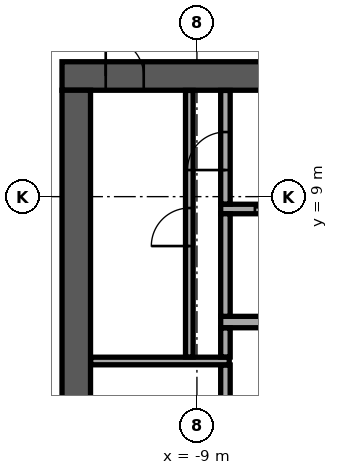
"""IFC4 building model, lengths in metres.
Left out: names, types, materials, properties, quantities, classifications, styles, units other than length and angle.
Written with IfcOpenShell. Run it as: python <this file> out.ifc"""

import sys

from ifc_helpers import new_model, si_unit, direction, frame, frame_2d, origin, place, context, subcontext, project, spatial, rectangle, extrude, element, fill, save


model = new_model("IFC4")
c1 = context("Model", 3, precision=1e-05, world=origin(), true_north=direction((0.0, 1.0)))
c2 = subcontext(c1, "Body", "Model", "MODEL_VIEW")
j1 = project(units=[si_unit("LENGTHUNIT", "METRE"), si_unit("PLANEANGLEUNIT", "RADIAN")], contexts=[c1])
p1 = place(None, origin())
s1 = spatial("IfcSite", under=j1, at=p1, CompositionType="ELEMENT")
p2 = place(p1, origin())
s2 = spatial("IfcBuilding", under=s1, at=p2, CompositionType="ELEMENT")
p3 = place(p2, frame((0.0, 0.0, 242.9)))
s3 = spatial("IfcBuildingStorey", under=s2, at=p3, CompositionType="ELEMENT", Elevation=242.9)
p4 = place(p3, frame((-12.55, 12.175, 0.0), z_axis=(0.0, 0.0, 1.0), x_axis=(1.0, 0.0, 0.0)))
e1 = element("IfcWall", 1, at=p4, inside=s3, PredefinedType="SHEAR", context=c2, shape_type="SweptSolid", body=[
    extrude(rectangle(XDim=25.1, YDim=0.75, at=frame_2d((12.55, 0.0))), origin(), (0.0, 0.0, 1.0), 3.64),
])
p5 = place(p4, frame((11.35, 0.0, 0.0)))
e2 = element("IfcOpeningElement", 2, at=p5, cuts=e1, PredefinedType="OPENING", context=c2, shape_type="SweptSolid", body=[
    extrude(rectangle(XDim=2.4, YDim=2.4, at=frame_2d((1.2, 1.2))), frame((0.0, 0.385, 0.0), z_axis=(0.0, -1.0, 0.0), x_axis=(1.0, 0.0, 0.0)), (0.0, 0.0, 1.0), 0.77),
])
p6 = place(p4, frame((22.175, 0.0, 0.0)))
e3 = element("IfcOpeningElement", 3, at=p6, cuts=e1, PredefinedType="OPENING", context=c2, shape_type="SweptSolid", body=[
    extrude(rectangle(XDim=1.2, YDim=2.1, at=frame_2d((0.6, 1.05))), frame((0.0, 0.385, 0.0), z_axis=(0.0, -1.0, 0.0), x_axis=(1.0, 0.0, 0.0)), (0.0, 0.0, 1.0), 0.77),
])
p7 = place(p4, frame((1.15, 0.0, 0.0)))
e4 = element("IfcOpeningElement", 4, at=p7, cuts=e1, PredefinedType="OPENING", context=c2, shape_type="SweptSolid", body=[
    extrude(rectangle(XDim=1.0, YDim=2.1, at=frame_2d((0.5, 1.05))), frame((0.0, 0.385, 0.0), z_axis=(0.0, -1.0, 0.0), x_axis=(1.0, 0.0, 0.0)), (0.0, 0.0, 1.0), 0.77),
])
p8 = place(p3, frame((-12.175, -11.8, 0.0), z_axis=(0.0, 0.0, 1.0), x_axis=(0.0, 1.0, 0.0)))
e5 = element("IfcWall", 5, at=p8, inside=s3, PredefinedType="SHEAR", context=c2, shape_type="SweptSolid", body=[
    extrude(rectangle(XDim=23.6, YDim=0.75, at=frame_2d((11.8, 0.0))), origin(), (0.0, 0.0, 1.0), 3.64),
])
p9 = place(p8, frame((10.6, 0.0, 0.0)))
e6 = element("IfcOpeningElement", 6, at=p9, cuts=e5, PredefinedType="OPENING", context=c2, shape_type="SweptSolid", body=[
    extrude(rectangle(XDim=2.4, YDim=2.4, at=frame_2d((1.2, 1.2))), frame((0.0, 0.385, 0.0), z_axis=(0.0, -1.0, 0.0), x_axis=(1.0, 0.0, 0.0)), (0.0, 0.0, 1.0), 0.77),
])
p10 = place(p3, frame((-8.375, 5.7, 0.0), z_axis=(0.0, 0.0, 1.0), x_axis=(1.0, 0.0, 0.0)))
e7 = element("IfcWall", 7, at=p10, inside=s3, PredefinedType="SOLIDWALL", context=c2, shape_type="SweptSolid", body=[
    extrude(rectangle(XDim=16.75, YDim=0.3, at=frame_2d((8.375, 0.0))), origin(), (0.0, 0.0, 1.0), 3.64),
])
p11 = place(p3, frame((-8.375, 8.675, 0.0), z_axis=(0.0, 0.0, 1.0), x_axis=(1.0, 0.0, 0.0)))
e8 = element("IfcWall", 8, at=p11, inside=s3, PredefinedType="SOLIDWALL", context=c2, shape_type="SweptSolid", body=[
    extrude(rectangle(XDim=16.75, YDim=0.25, at=frame_2d((8.375, 0.0))), origin(), (0.0, 0.0, 1.0), 3.64),
])
p12 = place(p11, frame((0.9, 0.0, 0.0)))
e9 = element("IfcOpeningElement", 9, at=p12, cuts=e8, PredefinedType="OPENING", context=c2, shape_type="SweptSolid", body=[
    extrude(rectangle(XDim=1.2, YDim=2.1, at=frame_2d((0.6, 1.05))), frame((0.0, 0.135, 0.0), z_axis=(0.0, -1.0, 0.0), x_axis=(1.0, 0.0, 0.0)), (0.0, 0.0, 1.0), 0.27),
])
p13 = place(p11, frame((3.65, 0.0, 0.0)))
e10 = element("IfcOpeningElement", 10, at=p13, cuts=e8, PredefinedType="OPENING", context=c2, shape_type="SweptSolid", body=[
    extrude(rectangle(XDim=1.2, YDim=2.1, at=frame_2d((0.6, 1.05))), frame((0.0, 0.135, 0.0), z_axis=(0.0, -1.0, 0.0), x_axis=(1.0, 0.0, 0.0)), (0.0, 0.0, 1.0), 0.27),
])
p14 = place(p11, frame((6.4, 0.0, 0.0)))
e11 = element("IfcOpeningElement", 11, at=p14, cuts=e8, PredefinedType="OPENING", context=c2, shape_type="SweptSolid", body=[
    extrude(rectangle(XDim=1.2, YDim=2.1, at=frame_2d((0.6, 1.05))), frame((0.0, 0.135, 0.0), z_axis=(0.0, -1.0, 0.0), x_axis=(1.0, 0.0, 0.0)), (0.0, 0.0, 1.0), 0.27),
])
p15 = place(p11, frame((9.15, 0.0, 0.0)))
e12 = element("IfcOpeningElement", 12, at=p15, cuts=e8, PredefinedType="OPENING", context=c2, shape_type="SweptSolid", body=[
    extrude(rectangle(XDim=1.2, YDim=2.1, at=frame_2d((0.6, 1.05))), frame((0.0, 0.135, 0.0), z_axis=(0.0, -1.0, 0.0), x_axis=(1.0, 0.0, 0.0)), (0.0, 0.0, 1.0), 0.27),
])
p16 = place(p11, frame((11.9, 0.0, 0.0)))
e13 = element("IfcOpeningElement", 13, at=p16, cuts=e8, PredefinedType="OPENING", context=c2, shape_type="SweptSolid", body=[
    extrude(rectangle(XDim=1.2, YDim=2.1, at=frame_2d((0.6, 1.05))), frame((0.0, 0.135, 0.0), z_axis=(0.0, -1.0, 0.0), x_axis=(1.0, 0.0, 0.0)), (0.0, 0.0, 1.0), 0.27),
])
p17 = place(p11, frame((14.65, 0.0, 0.0)))
e14 = element("IfcOpeningElement", 14, at=p17, cuts=e8, PredefinedType="OPENING", context=c2, shape_type="SweptSolid", body=[
    extrude(rectangle(XDim=1.2, YDim=2.1, at=frame_2d((0.6, 1.05))), frame((0.0, 0.135, 0.0), z_axis=(0.0, -1.0, 0.0), x_axis=(1.0, 0.0, 0.0)), (0.0, 0.0, 1.0), 0.27),
])
p18 = place(p3, frame((-8.25, 5.85, 0.0), z_axis=(0.0, 0.0, 1.0), x_axis=(0.0, 1.0, 0.0)))
e15 = element("IfcWall", 15, at=p18, inside=s3, PredefinedType="SOLIDWALL", context=c2, shape_type="SweptSolid", body=[
    extrude(rectangle(XDim=2.7, YDim=0.25, at=frame_2d((1.35, 0.0))), origin(), (0.0, 0.0, 1.0), 3.64),
])
p19 = place(p3, frame((-8.25, 2.855, 0.0), z_axis=(0.0, 0.0, 1.0), x_axis=(0.0, 1.0, 0.0)))
e16 = element("IfcWall", 16, at=p19, inside=s3, PredefinedType="PARTITIONING", context=c2, shape_type="SweptSolid", body=[
    extrude(rectangle(XDim=1.715, YDim=0.25, at=frame_2d((0.857, 0.0))), origin(), (0.0, 0.0, 1.0), 3.64),
])
p20 = place(p3, frame((-11.795, 4.675, 0.0), z_axis=(0.0, 0.0, 1.0), x_axis=(1.0, 0.0, 0.0)))
e17 = element("IfcWall", 17, at=p20, inside=s3, PredefinedType="PARTITIONING", context=c2, shape_type="SweptSolid", body=[
    extrude(rectangle(XDim=3.645, YDim=0.2, at=frame_2d((1.823, 0.0))), origin(), (0.0, 0.0, 1.0), 3.64),
])
p21 = place(p3, frame((-9.2, 4.78, 0.0), z_axis=(0.0, 0.0, 1.0), x_axis=(0.0, 1.0, 0.0)))
e18 = element("IfcWall", 18, at=p21, inside=s3, PredefinedType="PARTITIONING", context=c2, shape_type="SweptSolid", body=[
    extrude(rectangle(XDim=7.015, YDim=0.2, at=frame_2d((3.507, 0.0))), origin(), (0.0, 0.0, 1.0), 3.64),
])
p22 = place(p21, frame((2.92, 0.0, 0.0)))
e19 = element("IfcOpeningElement", 19, at=p22, cuts=e18, PredefinedType="OPENING", context=c2, shape_type="SweptSolid", body=[
    extrude(rectangle(XDim=1.0, YDim=2.1, at=frame_2d((0.5, 1.05))), frame((0.0, 0.11, 0.0), z_axis=(0.0, -1.0, 0.0), x_axis=(1.0, 0.0, 0.0)), (0.0, 0.0, 1.0), 0.22),
])
p23 = place(p3, frame((-8.25, 4.78, 0.0), z_axis=(0.0, 0.0, 1.0), x_axis=(0.0, 1.0, 0.0)))
e20 = element("IfcWall", 20, at=p23, inside=s3, PredefinedType="PARTITIONING", context=c2, shape_type="SweptSolid", body=[
    extrude(rectangle(XDim=0.765, YDim=0.25, at=frame_2d((0.382, 0.0))), origin(), (0.0, 0.0, 1.0), 3.64),
])
p24 = place(p3, frame((-8.25, 8.805, 0.0), z_axis=(0.0, 0.0, 1.0), x_axis=(0.0, 1.0, 0.0)))
e21 = element("IfcWall", 21, at=p24, inside=s3, PredefinedType="PARTITIONING", context=c2, shape_type="SweptSolid", body=[
    extrude(rectangle(XDim=2.99, YDim=0.25, at=frame_2d((1.495, 0.0))), origin(), (0.0, 0.0, 1.0), 3.64),
])
p25 = place(p24, frame((0.895, 0.0, 0.0)))
e22 = element("IfcOpeningElement", 22, at=p25, cuts=e21, PredefinedType="OPENING", context=c2, shape_type="SweptSolid", body=[
    extrude(rectangle(XDim=1.0, YDim=2.1, at=frame_2d((0.5, 1.05))), frame((0.0, 0.135, 0.0), z_axis=(0.0, -1.0, 0.0), x_axis=(1.0, 0.0, 0.0)), (0.0, 0.0, 1.0), 0.27),
])
p26 = place(p3, frame((-5.115, 33.491, 0.0), z_axis=(0.0, 0.0, 1.0), x_axis=(-0.57357740375, -0.819151366908, 0.0)))
e23 = element("IfcWall", 23, at=p26, inside=s3, PredefinedType="STANDARD", context=c2, shape_type="SweptSolid", body=[
    extrude(rectangle(XDim=48.843, YDim=0.6, at=frame_2d((24.422, 0.0))), origin(), (0.0, 0.0, 1.0), 3.64),
])
p27 = place(p26, frame((1.22, 0.0, 0.9)))
e24 = element("IfcOpeningElement", 24, at=p27, cuts=e23, PredefinedType="OPENING", context=c2, shape_type="SweptSolid", body=[
    extrude(rectangle(XDim=2.0, YDim=2.1, at=frame_2d((1.0, 1.05))), frame((0.0, 0.31, 0.0), z_axis=(0.0, -1.0, 0.0), x_axis=(1.0, 0.0, 0.0)), (0.0, 0.0, 1.0), 0.62),
])
p28 = place(p26, frame((5.66, 0.0, 0.9)))
e25 = element("IfcOpeningElement", 25, at=p28, cuts=e23, PredefinedType="OPENING", context=c2, shape_type="SweptSolid", body=[
    extrude(rectangle(XDim=2.0, YDim=2.1, at=frame_2d((1.0, 1.05))), frame((0.0, 0.31, 0.0), z_axis=(0.0, -1.0, 0.0), x_axis=(1.0, 0.0, 0.0)), (0.0, 0.0, 1.0), 0.62),
])
p29 = place(p26, frame((10.101, 0.0, 0.9)))
e26 = element("IfcOpeningElement", 26, at=p29, cuts=e23, PredefinedType="OPENING", context=c2, shape_type="SweptSolid", body=[
    extrude(rectangle(XDim=2.0, YDim=2.1, at=frame_2d((1.0, 1.05))), frame((0.0, 0.31, 0.0), z_axis=(0.0, -1.0, 0.0), x_axis=(1.0, 0.0, 0.0)), (0.0, 0.0, 1.0), 0.62),
])
p30 = place(p26, frame((14.541, 0.0, 0.9)))
e27 = element("IfcOpeningElement", 27, at=p30, cuts=e23, PredefinedType="OPENING", context=c2, shape_type="SweptSolid", body=[
    extrude(rectangle(XDim=2.0, YDim=2.1, at=frame_2d((1.0, 1.05))), frame((0.0, 0.31, 0.0), z_axis=(0.0, -1.0, 0.0), x_axis=(1.0, 0.0, 0.0)), (0.0, 0.0, 1.0), 0.62),
])
p31 = place(p26, frame((18.981, 0.0, 0.9)))
e28 = element("IfcOpeningElement", 28, at=p31, cuts=e23, PredefinedType="OPENING", context=c2, shape_type="SweptSolid", body=[
    extrude(rectangle(XDim=2.0, YDim=2.1, at=frame_2d((1.0, 1.05))), frame((0.0, 0.31, 0.0), z_axis=(0.0, -1.0, 0.0), x_axis=(1.0, 0.0, 0.0)), (0.0, 0.0, 1.0), 0.62),
])
p32 = place(p26, frame((23.422, 0.0, 0.9)))
e29 = element("IfcOpeningElement", 29, at=p32, cuts=e23, PredefinedType="OPENING", context=c2, shape_type="SweptSolid", body=[
    extrude(rectangle(XDim=2.0, YDim=2.1, at=frame_2d((1.0, 1.05))), frame((0.0, 0.31, 0.0), z_axis=(0.0, -1.0, 0.0), x_axis=(1.0, 0.0, 0.0)), (0.0, 0.0, 1.0), 0.62),
])
p33 = place(p26, frame((27.862, 0.0, 0.9)))
e30 = element("IfcOpeningElement", 30, at=p33, cuts=e23, PredefinedType="OPENING", context=c2, shape_type="SweptSolid", body=[
    extrude(rectangle(XDim=2.0, YDim=2.1, at=frame_2d((1.0, 1.05))), frame((0.0, 0.31, 0.0), z_axis=(0.0, -1.0, 0.0), x_axis=(1.0, 0.0, 0.0)), (0.0, 0.0, 1.0), 0.62),
])
p34 = place(p26, frame((32.302, 0.0, 0.9)))
e31 = element("IfcOpeningElement", 31, at=p34, cuts=e23, PredefinedType="OPENING", context=c2, shape_type="SweptSolid", body=[
    extrude(rectangle(XDim=2.0, YDim=2.1, at=frame_2d((1.0, 1.05))), frame((0.0, 0.31, 0.0), z_axis=(0.0, -1.0, 0.0), x_axis=(1.0, 0.0, 0.0)), (0.0, 0.0, 1.0), 0.62),
])
p35 = place(p26, frame((36.742, 0.0, 0.9)))
e32 = element("IfcOpeningElement", 32, at=p35, cuts=e23, PredefinedType="OPENING", context=c2, shape_type="SweptSolid", body=[
    extrude(rectangle(XDim=2.0, YDim=2.1, at=frame_2d((1.0, 1.05))), frame((0.0, 0.31, 0.0), z_axis=(0.0, -1.0, 0.0), x_axis=(1.0, 0.0, 0.0)), (0.0, 0.0, 1.0), 0.62),
])
p36 = place(p26, frame((41.183, 0.0, 0.9)))
e33 = element("IfcOpeningElement", 33, at=p36, cuts=e23, PredefinedType="OPENING", context=c2, shape_type="SweptSolid", body=[
    extrude(rectangle(XDim=2.0, YDim=2.1, at=frame_2d((1.0, 1.05))), frame((0.0, 0.31, 0.0), z_axis=(0.0, -1.0, 0.0), x_axis=(1.0, 0.0, 0.0)), (0.0, 0.0, 1.0), 0.62),
])
p37 = place(p26, frame((45.623, 0.0, 0.9)))
e34 = element("IfcOpeningElement", 34, at=p37, cuts=e23, PredefinedType="OPENING", context=c2, shape_type="SweptSolid", body=[
    extrude(rectangle(XDim=2.0, YDim=2.1, at=frame_2d((1.0, 1.05))), frame((0.0, 0.31, 0.0), z_axis=(0.0, -1.0, 0.0), x_axis=(1.0, 0.0, 0.0)), (0.0, 0.0, 1.0), 0.62),
])
p38 = place(p7, origin())
e35 = element("IfcDoor", 35, at=p38, inside=s3, OperationType="SINGLE_SWING_LEFT", PredefinedType="DOOR", context=c2, shape_type="SweptSolid", body=[
    extrude(rectangle(XDim=1.0, YDim=2.1, at=frame_2d((0.5, 1.05))), frame((0.0, 0.025, 0.0), z_axis=(0.0, -1.0, 0.0), x_axis=(1.0, 0.0, 0.0)), (0.0, 0.0, 1.0), 0.05),
])
fill(e4, e35)
p39 = place(p12, origin())
e36 = element("IfcDoor", 36, at=p39, inside=s3, OperationType="DOUBLE_DOOR_SLIDING", PredefinedType="DOOR", context=c2, shape_type="SweptSolid", body=[
    extrude(rectangle(XDim=1.2, YDim=2.1, at=frame_2d((0.6, 1.05))), frame((0.0, 0.025, 0.0), z_axis=(0.0, -1.0, 0.0), x_axis=(1.0, 0.0, 0.0)), (0.0, 0.0, 1.0), 0.05),
])
fill(e9, e36)
p40 = place(p22, origin())
e37 = element("IfcDoor", 37, at=p40, inside=s3, OperationType="SINGLE_SWING_RIGHT", PredefinedType="DOOR", context=c2, shape_type="SweptSolid", body=[
    extrude(rectangle(XDim=1.0, YDim=2.1, at=frame_2d((0.5, 1.05))), frame((0.0, 0.025, 0.0), z_axis=(0.0, -1.0, 0.0), x_axis=(1.0, 0.0, 0.0)), (0.0, 0.0, 1.0), 0.05),
])
fill(e19, e37)
p41 = place(p25, origin())
e38 = element("IfcDoor", 38, at=p41, inside=s3, OperationType="SINGLE_SWING_RIGHT", PredefinedType="DOOR", context=c2, shape_type="SweptSolid", body=[
    extrude(rectangle(XDim=1.0, YDim=2.1, at=frame_2d((0.5, 1.05))), frame((0.0, 0.025, 0.0), z_axis=(0.0, -1.0, 0.0), x_axis=(1.0, 0.0, 0.0)), (0.0, 0.0, 1.0), 0.05),
])
fill(e22, e38)
save(model, sys.argv[1])
